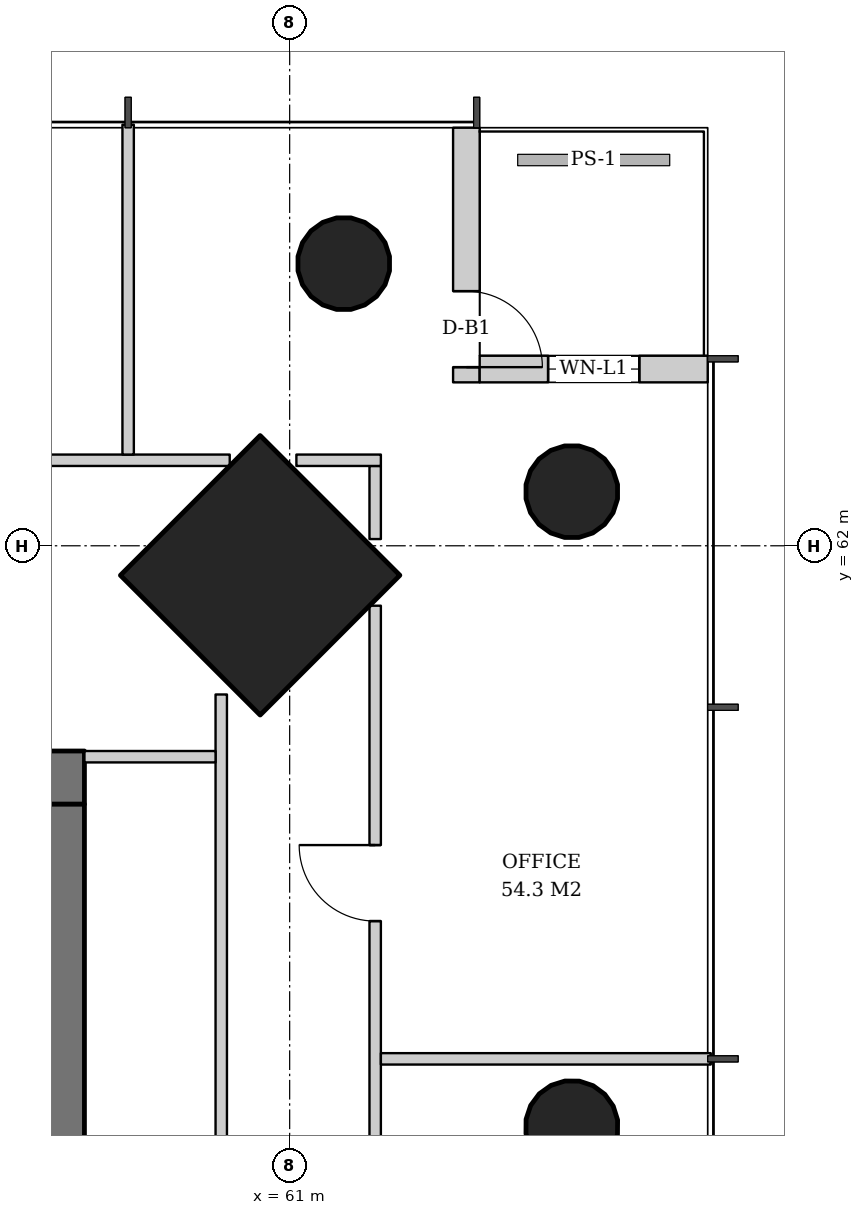
"""IFC4 building model, lengths in metres.
Left out: names, types, materials, properties, quantities, classifications, styles, units other than length and angle.
Written with IfcOpenShell. Run it as: python <this file> out.ifc"""

import sys

from ifc_helpers import new_model, si_unit, direction, frame, frame_2d, origin, origin_2d, place, context, subcontext, project, spatial, rectangle, hollow_circle, extrude, element, fill, save


model = new_model("IFC4")
c1 = context("Model", 3, precision=1e-05, world=origin(), true_north=direction((0.0, 1.0)))
c2 = subcontext(c1, "Body", "Model", "MODEL_VIEW")
j1 = project(units=[si_unit("LENGTHUNIT", "METRE"), si_unit("PLANEANGLEUNIT", "RADIAN")], contexts=[c1])
p1 = place(None, origin())
s1 = spatial("IfcSite", under=j1, at=p1, CompositionType="ELEMENT")
p2 = place(p1, origin())
s2 = spatial("IfcBuilding", under=s1, at=p2, CompositionType="ELEMENT")
p3 = place(p2, frame((0.0, 0.0, 154.0)))
s3 = spatial("IfcBuildingStorey", under=s2, at=p3, CompositionType="ELEMENT", Elevation=154.0)
p4 = place(p3, frame((60.65, 61.65, 0.0), z_axis=(-0.031898107953, -0.031898107953, 0.998981992539), x_axis=(0.707106781187, -0.707106781187, 0.0)))
e1 = element("IfcColumn", 1, at=p4, inside=s3, PredefinedType="COLUMN", context=c2, shape_type="SweptSolid", body=[
    extrude(rectangle(XDim=2.6, YDim=2.6, at=origin_2d()), origin(), (0.0, 0.0, 1.0), 3.804),
])
p5 = place(p3, frame((64.75, 62.75, 0.0), z_axis=(-0.031898107953, -0.031898107953, 0.998981992539), x_axis=(0.707106781187, -0.707106781187, 0.0)))
e2 = element("IfcColumn", 2, at=p5, inside=s3, PredefinedType="COLUMN", context=c2, shape_type="SweptSolid", body=[
    extrude(hollow_circle(Radius=0.61, WallThickness=0.04, at=origin_2d()), origin(), (0.0, 0.0, 1.0), 3.804),
])
p6 = place(p3, frame((64.75, 54.375, 0.0), z_axis=(-0.031910269556, -0.015987237665, 0.999362868496), x_axis=(0.447933021895, -0.894067115991, 0.0)))
e3 = element("IfcColumn", 3, at=p6, inside=s3, PredefinedType="COLUMN", context=c2, shape_type="SweptSolid", body=[
    extrude(hollow_circle(Radius=0.61, WallThickness=0.04, at=origin_2d()), origin(), (0.0, 0.0, 1.0), 3.802),
])
p7 = place(p3, frame((61.75, 65.75, 0.0), z_axis=(-0.031898107953, -0.031898107953, 0.998981992539), x_axis=(0.707106781187, -0.707106781187, 0.0)))
e4 = element("IfcColumn", 4, at=p7, inside=s3, PredefinedType="COLUMN", context=c2, shape_type="SweptSolid", body=[
    extrude(hollow_circle(Radius=0.61, WallThickness=0.04, at=origin_2d()), origin(), (0.0, 0.0, 1.0), 3.804),
])
p8 = place(p3, frame((31.7, 58.95, 0.0), z_axis=(0.0, 0.0, 1.0), x_axis=(1.0, 0.0, 0.0)))
e5 = element("IfcWall", 5, at=p8, inside=s3, PredefinedType="SHEAR", context=c2, shape_type="SweptSolid", body=[
    extrude(rectangle(XDim=26.6, YDim=0.7, at=frame_2d((13.3, 0.0))), origin(), (0.0, 0.0, 1.0), 3.8),
])
p9 = place(p8, frame((17.94, 0.0, 0.0)))
e6 = element("IfcOpeningElement", 6, at=p9, cuts=e5, PredefinedType="OPENING", context=c2, shape_type="SweptSolid", body=[
    extrude(rectangle(XDim=1.0, YDim=2.1, at=frame_2d((0.5, 1.05))), frame((0.0, 0.36, 0.0), z_axis=(0.0, -1.0, 0.0), x_axis=(1.0, 0.0, 0.0)), (0.0, 0.0, 1.0), 0.72),
])
p10 = place(p8, frame((5.825, 0.0, 0.0)))
e7 = element("IfcOpeningElement", 7, at=p10, cuts=e5, PredefinedType="OPENING", context=c2, shape_type="SweptSolid", body=[
    extrude(rectangle(XDim=1.0, YDim=2.1, at=frame_2d((0.5, 1.05))), frame((0.0, 0.36, 0.0), z_axis=(0.0, -1.0, 0.0), x_axis=(1.0, 0.0, 0.0)), (0.0, 0.0, 1.0), 0.72),
])
p11 = place(p8, frame((1.837, 0.0, 0.0)))
e8 = element("IfcOpeningElement", 8, at=p11, cuts=e5, PredefinedType="OPENING", context=c2, shape_type="SweptSolid", body=[
    extrude(rectangle(XDim=1.0, YDim=2.1, at=frame_2d((0.5, 1.05))), frame((0.0, 0.36, 0.0), z_axis=(0.0, -1.0, 0.0), x_axis=(1.0, 0.0, 0.0)), (0.0, 0.0, 1.0), 0.72),
])
p12 = place(p8, frame((3.781, 0.0, 0.0)))
e9 = element("IfcOpeningElement", 9, at=p12, cuts=e5, PredefinedType="OPENING", context=c2, shape_type="SweptSolid", body=[
    extrude(rectangle(XDim=1.0, YDim=2.1, at=frame_2d((0.5, 1.05))), frame((0.0, 0.36, 0.0), z_axis=(0.0, -1.0, 0.0), x_axis=(1.0, 0.0, 0.0)), (0.0, 0.0, 1.0), 0.72),
])
p13 = place(p8, frame((7.95, 0.0, 0.0)))
e10 = element("IfcOpeningElement", 10, at=p13, cuts=e5, PredefinedType="OPENING", context=c2, shape_type="SweptSolid", body=[
    extrude(rectangle(XDim=1.0, YDim=2.1, at=frame_2d((0.5, 1.05))), frame((0.0, 0.36, 0.0), z_axis=(0.0, -1.0, 0.0), x_axis=(1.0, 0.0, 0.0)), (0.0, 0.0, 1.0), 0.72),
])
p14 = place(p8, frame((11.038, 0.0, 0.0)))
e11 = element("IfcOpeningElement", 11, at=p14, cuts=e5, PredefinedType="OPENING", context=c2, shape_type="SweptSolid", body=[
    extrude(rectangle(XDim=1.0, YDim=2.1, at=frame_2d((0.5, 1.05))), frame((0.0, 0.36, 0.0), z_axis=(0.0, -1.0, 0.0), x_axis=(1.0, 0.0, 0.0)), (0.0, 0.0, 1.0), 0.72),
])
p15 = place(p8, frame((14.666, 0.0, 0.0)))
e12 = element("IfcOpeningElement", 12, at=p15, cuts=e5, PredefinedType="OPENING", context=c2, shape_type="SweptSolid", body=[
    extrude(rectangle(XDim=1.0, YDim=2.1, at=frame_2d((0.5, 1.05))), frame((0.0, 0.36, 0.0), z_axis=(0.0, -1.0, 0.0), x_axis=(1.0, 0.0, 0.0)), (0.0, 0.0, 1.0), 0.72),
])
p16 = place(p8, frame((20.9, 0.0, 0.0)))
e13 = element("IfcOpeningElement", 13, at=p16, cuts=e5, PredefinedType="OPENING", context=c2, shape_type="SweptSolid", body=[
    extrude(rectangle(XDim=1.0, YDim=2.1, at=frame_2d((0.5, 1.05))), frame((0.0, 0.36, 0.0), z_axis=(0.0, -1.0, 0.0), x_axis=(1.0, 0.0, 0.0)), (0.0, 0.0, 1.0), 0.72),
])
p17 = place(p8, frame((23.75, 0.0, 0.0)))
e14 = element("IfcOpeningElement", 14, at=p17, cuts=e5, PredefinedType="OPENING", context=c2, shape_type="SweptSolid", body=[
    extrude(rectangle(XDim=1.0, YDim=2.1, at=frame_2d((0.5, 1.05))), frame((0.0, 0.36, 0.0), z_axis=(0.0, -1.0, 0.0), x_axis=(1.0, 0.0, 0.0)), (0.0, 0.0, 1.0), 0.72),
])
p18 = place(p3, frame((57.95, 33.4, 0.0), z_axis=(0.0, 0.0, 1.0), x_axis=(0.0, 1.0, 0.0)))
e15 = element("IfcWall", 15, at=p18, inside=s3, PredefinedType="SHEAR", context=c2, shape_type="SweptSolid", body=[
    extrude(rectangle(XDim=25.2, YDim=0.7, at=frame_2d((12.6, 0.0))), origin(), (0.0, 0.0, 1.0), 3.8),
])
p19 = place(p18, frame((11.7, 0.0, 0.0)))
e16 = element("IfcOpeningElement", 16, at=p19, cuts=e15, PredefinedType="OPENING", context=c2, shape_type="SweptSolid", body=[
    extrude(rectangle(XDim=1.8, YDim=2.4, at=frame_2d((0.9, 1.2))), frame((0.0, 0.36, 0.0), z_axis=(0.0, -1.0, 0.0), x_axis=(1.0, 0.0, 0.0)), (0.0, 0.0, 1.0), 0.72),
])
p20 = place(p3, frame((63.325, 67.5, 0.0), z_axis=(0.0, 0.0, 1.0), x_axis=(0.0, -1.0, 0.0)))
e17 = element("IfcWall", 17, at=p20, inside=s3, PredefinedType="SOLIDWALL", context=c2, shape_type="SweptSolid", body=[
    extrude(rectangle(XDim=3.35, YDim=0.35, at=frame_2d((1.675, 0.0))), origin(), (0.0, 0.0, 1.0), 3.52),
])
p21 = place(p20, frame((2.15, 0.0, 0.0)))
e18 = element("IfcOpeningElement", 18, at=p21, cuts=e17, PredefinedType="OPENING", context=c2, shape_type="SweptSolid", body=[
    extrude(rectangle(XDim=1.0, YDim=2.4, at=frame_2d((0.5, 1.2))), frame((0.0, 0.185, 0.0), z_axis=(0.0, -1.0, 0.0), x_axis=(1.0, 0.0, 0.0)), (0.0, 0.0, 1.0), 0.37),
])
p22 = place(p3, frame((63.5, 64.325, 0.0), z_axis=(0.0, 0.0, 1.0), x_axis=(1.0, 0.0, 0.0)))
e19 = element("IfcWall", 19, at=p22, inside=s3, PredefinedType="SOLIDWALL", context=c2, shape_type="SweptSolid", body=[
    extrude(rectangle(XDim=3.0, YDim=0.35, at=frame_2d((1.5, 0.0))), origin(), (0.0, 0.0, 1.0), 3.52),
])
p23 = place(p22, frame((0.9, 0.0, 0.6)))
e20 = element("IfcOpeningElement", 20, at=p23, cuts=e19, PredefinedType="OPENING", context=c2, shape_type="SweptSolid", body=[
    extrude(rectangle(XDim=1.2, YDim=2.55, at=frame_2d((0.6, 1.275))), frame((0.0, 0.185, 0.0), z_axis=(0.0, -1.0, 0.0), x_axis=(1.0, 0.0, 0.0)), (0.0, 0.0, 1.0), 0.37),
])
p24 = place(p3, frame((60.1, 48.025, 0.0), z_axis=(0.0, 0.0, 1.0), x_axis=(0.0, 1.0, 0.0)))
e21 = element("IfcWall", 21, at=p24, inside=s3, PredefinedType="PARTITIONING", context=c2, shape_type="SweptSolid", body=[
    extrude(rectangle(XDim=12.019, YDim=0.15, at=frame_2d((6.009, 0.0))), origin(), (0.0, 0.0, 1.0), 2.706),
])
p25 = place(p24, frame((5.137, 0.0, 0.0)))
e22 = element("IfcOpeningElement", 22, at=p25, cuts=e21, PredefinedType="OPENING", context=c2, shape_type="SweptSolid", body=[
    extrude(rectangle(XDim=1.0, YDim=2.1, at=frame_2d((0.5, 1.05))), frame((0.0, 0.085, 0.0), z_axis=(0.0, -1.0, 0.0), x_axis=(1.0, 0.0, 0.0)), (0.0, 0.0, 1.0), 0.17),
])
p26 = place(p3, frame((58.3, 59.225, 0.0), z_axis=(0.0, 0.0, 1.0), x_axis=(1.0, 0.0, 0.0)))
e23 = element("IfcWall", 23, at=p26, inside=s3, PredefinedType="PARTITIONING", context=c2, shape_type="SweptSolid", body=[
    extrude(rectangle(XDim=1.725, YDim=0.15, at=frame_2d((0.862, 0.0))), origin(), (0.0, 0.0, 1.0), 3.52),
])
p27 = place(p3, frame((62.125, 30.789, 0.0), z_axis=(0.0, 0.0, 1.0), x_axis=(0.0, 1.0, 0.0)))
e24 = element("IfcWall", 24, at=p27, inside=s3, PredefinedType="PARTITIONING", context=c2, shape_type="SweptSolid", body=[
    extrude(rectangle(XDim=30.423, YDim=0.15, at=frame_2d((15.211, 0.0))), origin(), (0.0, 0.0, 1.0), 2.706),
])
p28 = place(p27, frame((3.149, 0.0, 0.0)))
e25 = element("IfcOpeningElement", 25, at=p28, cuts=e24, PredefinedType="OPENING", context=c2, shape_type="SweptSolid", body=[
    extrude(rectangle(XDim=1.0, YDim=2.1, at=frame_2d((0.5, 1.05))), frame((0.0, 0.085, 0.0), z_axis=(0.0, -1.0, 0.0), x_axis=(1.0, 0.0, 0.0)), (0.0, 0.0, 1.0), 0.17),
])
p29 = place(p27, frame((7.774, 0.0, 0.0)))
e26 = element("IfcOpeningElement", 26, at=p29, cuts=e24, PredefinedType="OPENING", context=c2, shape_type="SweptSolid", body=[
    extrude(rectangle(XDim=1.0, YDim=2.1, at=frame_2d((0.5, 1.05))), frame((0.0, 0.085, 0.0), z_axis=(0.0, -1.0, 0.0), x_axis=(1.0, 0.0, 0.0)), (0.0, 0.0, 1.0), 0.17),
])
p30 = place(p27, frame((12.399, 0.0, 0.0)))
e27 = element("IfcOpeningElement", 27, at=p30, cuts=e24, PredefinedType="OPENING", context=c2, shape_type="SweptSolid", body=[
    extrude(rectangle(XDim=1.0, YDim=2.1, at=frame_2d((0.5, 1.05))), frame((0.0, 0.085, 0.0), z_axis=(0.0, -1.0, 0.0), x_axis=(1.0, 0.0, 0.0)), (0.0, 0.0, 1.0), 0.17),
])
p31 = place(p27, frame((17.024, 0.0, 0.0)))
e28 = element("IfcOpeningElement", 28, at=p31, cuts=e24, PredefinedType="OPENING", context=c2, shape_type="SweptSolid", body=[
    extrude(rectangle(XDim=1.0, YDim=2.1, at=frame_2d((0.5, 1.05))), frame((0.0, 0.085, 0.0), z_axis=(0.0, -1.0, 0.0), x_axis=(1.0, 0.0, 0.0)), (0.0, 0.0, 1.0), 0.17),
])
p32 = place(p27, frame((26.274, 0.0, 0.0)))
e29 = element("IfcOpeningElement", 29, at=p32, cuts=e24, PredefinedType="OPENING", context=c2, shape_type="SweptSolid", body=[
    extrude(rectangle(XDim=1.0, YDim=2.1, at=frame_2d((0.5, 1.05))), frame((0.0, 0.085, 0.0), z_axis=(0.0, -1.0, 0.0), x_axis=(1.0, 0.0, 0.0)), (0.0, 0.0, 1.0), 0.17),
])
p33 = place(p3, frame((62.125, 62.088, 0.0), z_axis=(0.0, 0.0, 1.0), x_axis=(0.0, 1.0, 0.0)))
e30 = element("IfcWall", 30, at=p33, inside=s3, PredefinedType="PARTITIONING", context=c2, shape_type="SweptSolid", body=[
    extrude(rectangle(XDim=0.962, YDim=0.15, at=frame_2d((0.481, 0.0))), origin(), (0.0, 0.0, 1.0), 2.92),
])
p34 = place(p3, frame((62.2, 55.25, 0.0), z_axis=(0.0, 0.0, 1.0), x_axis=(1.0, 0.0, 0.0)))
e31 = element("IfcWall", 31, at=p34, inside=s3, PredefinedType="PARTITIONING", context=c2, shape_type="SweptSolid", body=[
    extrude(rectangle(XDim=4.34, YDim=0.15, at=frame_2d((2.17, 0.0))), origin(), (0.0, 0.0, 1.0), 3.52),
])
p35 = place(p3, frame((62.2, 63.125, 0.0), z_axis=(0.0, 0.0, 1.0), x_axis=(-1.0, 0.0, 0.0)))
e32 = element("IfcWall", 32, at=p35, inside=s3, PredefinedType="PARTITIONING", context=c2, shape_type="SweptSolid", body=[
    extrude(rectangle(XDim=1.112, YDim=0.15, at=frame_2d((0.556, 0.0))), origin(), (0.0, 0.0, 1.0), 2.92),
])
p36 = place(p3, frame((60.211, 63.125, 0.0), z_axis=(0.0, 0.0, 1.0), x_axis=(-1.0, 0.0, 0.0)))
e33 = element("IfcWall", 33, at=p36, inside=s3, PredefinedType="PARTITIONING", context=c2, shape_type="SweptSolid", body=[
    extrude(rectangle(XDim=30.423, YDim=0.15, at=frame_2d((15.211, 0.0))), origin(), (0.0, 0.0, 1.0), 2.706),
])
p37 = place(p36, frame((2.749, 0.0, 0.0)))
e34 = element("IfcOpeningElement", 34, at=p37, cuts=e33, PredefinedType="OPENING", context=c2, shape_type="SweptSolid", body=[
    extrude(rectangle(XDim=1.8, YDim=2.4, at=frame_2d((0.9, 1.2))), frame((0.0, 0.085, 0.0), z_axis=(0.0, -1.0, 0.0), x_axis=(1.0, 0.0, 0.0)), (0.0, 0.0, 1.0), 0.17),
])
p38 = place(p36, frame((7.374, 0.0, 0.0)))
e35 = element("IfcOpeningElement", 35, at=p38, cuts=e33, PredefinedType="OPENING", context=c2, shape_type="SweptSolid", body=[
    extrude(rectangle(XDim=1.8, YDim=2.4, at=frame_2d((0.9, 1.2))), frame((0.0, 0.085, 0.0), z_axis=(0.0, -1.0, 0.0), x_axis=(1.0, 0.0, 0.0)), (0.0, 0.0, 1.0), 0.17),
])
p39 = place(p3, frame((58.875, 63.2, 0.0), z_axis=(0.0, 0.0, 1.0), x_axis=(0.0, 1.0, 0.0)))
e36 = element("IfcWall", 36, at=p39, inside=s3, PredefinedType="PARTITIONING", context=c2, shape_type="SweptSolid", body=[
    extrude(rectangle(XDim=4.34, YDim=0.15, at=frame_2d((2.17, 0.0))), origin(), (0.0, 0.0, 1.0), 3.12),
])
p40 = place(p21, origin())
e37 = element("IfcDoor", 37, at=p40, inside=s3, OperationType="SINGLE_SWING_RIGHT", PredefinedType="DOOR", context=c2, shape_type="SweptSolid", body=[
    extrude(rectangle(XDim=1.0, YDim=2.4, at=frame_2d((0.5, 1.2))), frame((0.0, 0.025, 0.0), z_axis=(0.0, -1.0, 0.0), x_axis=(1.0, 0.0, 0.0)), (0.0, 0.0, 1.0), 0.05),
])
fill(e18, e37)
p41 = place(p23, origin())
e38 = element("IfcWindow", 38, at=p41, inside=s3, PartitioningType="SINGLE_PANEL", PredefinedType="WINDOW", context=c2, shape_type="SweptSolid", body=[
    extrude(rectangle(XDim=1.2, YDim=2.55, at=frame_2d((0.6, 1.275))), frame((0.0, 0.03, 0.0), z_axis=(0.0, -1.0, 0.0), x_axis=(1.0, 0.0, 0.0)), (0.0, 0.0, 1.0), 0.06),
])
fill(e20, e38)
p42 = place(p32, origin())
e39 = element("IfcDoor", 39, at=p42, inside=s3, OperationType="SINGLE_SWING_RIGHT", PredefinedType="DOOR", context=c2, shape_type="SweptSolid", body=[
    extrude(rectangle(XDim=1.0, YDim=2.1, at=frame_2d((0.5, 1.05))), frame((0.0, 0.025, 0.0), z_axis=(0.0, -1.0, 0.0), x_axis=(1.0, 0.0, 0.0)), (0.0, 0.0, 1.0), 0.05),
])
fill(e29, e39)
save(model, sys.argv[1])
